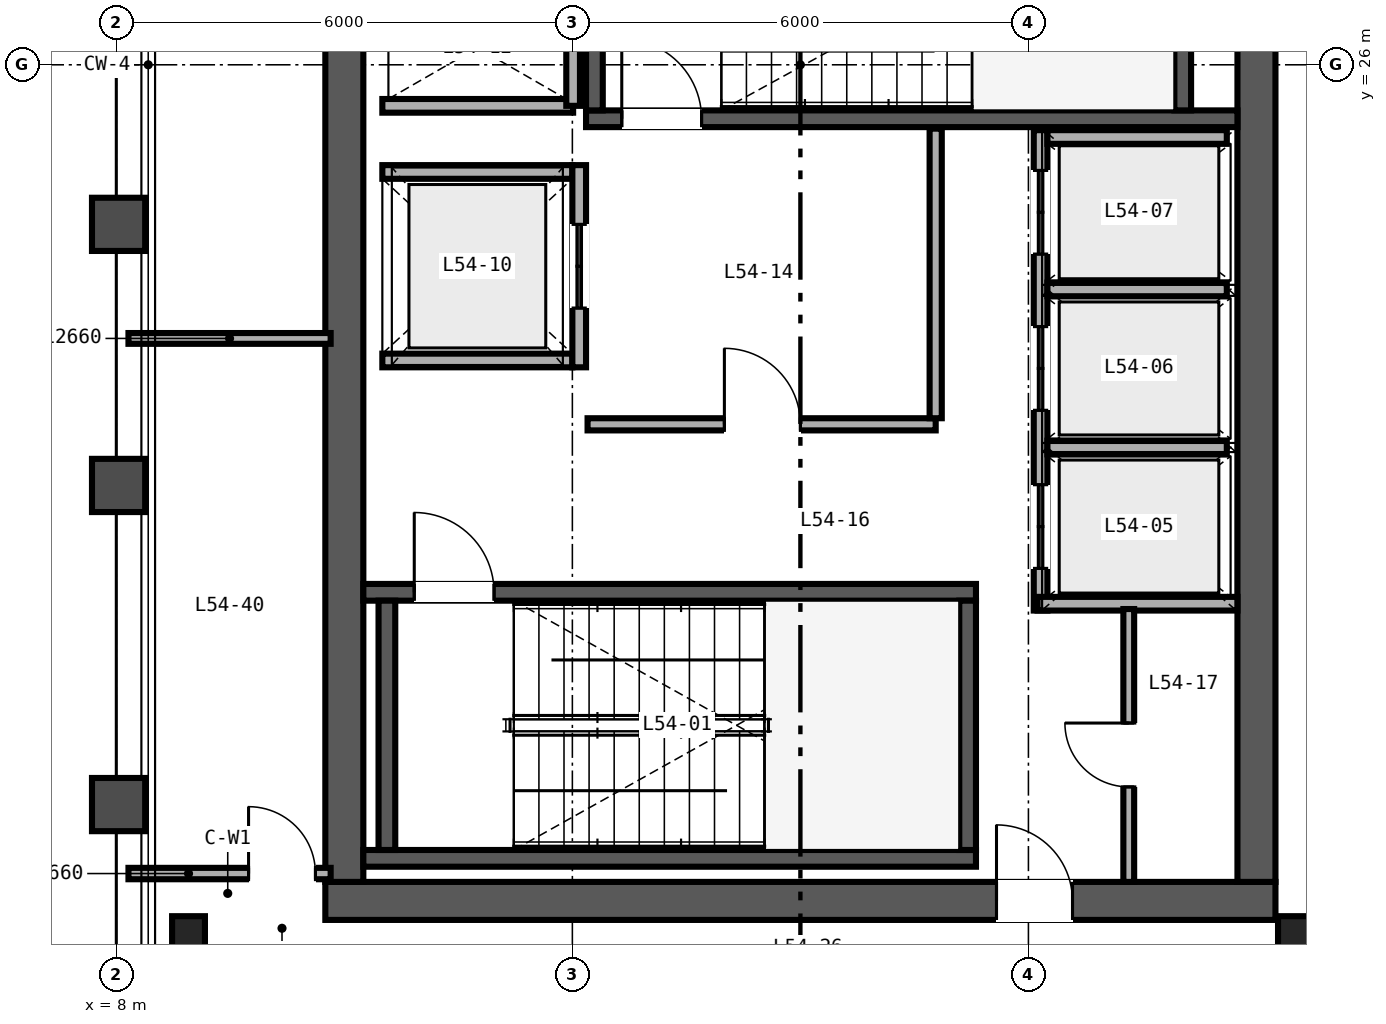
"""IFC4 building model, lengths in metres.
Left out: names, types, materials, properties, quantities, classifications, styles, units other than length and angle.
Written with IfcOpenShell. Run it as: python <this file> out.ifc"""

import sys

from ifc_helpers import new_model, si_unit, direction, frame, frame_2d, origin, origin_2d, place, context, subcontext, project, spatial, rectangle, i_section, extrude, source, transform, mapped, element, fill, save


model = new_model("IFC4")
c1 = context("Model", 3, precision=1e-05, world=origin(), true_north=direction((0.0, 1.0)))
c2 = subcontext(c1, "Body", "Model", "MODEL_VIEW")
j1 = project(units=[si_unit("LENGTHUNIT", "METRE"), si_unit("PLANEANGLEUNIT", "RADIAN")], contexts=[c1])
p1 = place(None, origin())
s1 = spatial("IfcSite", under=j1, at=p1, CompositionType="ELEMENT")
p2 = place(p1, origin())
s2 = spatial("IfcBuilding", under=s1, at=p2, CompositionType="ELEMENT")
p3 = place(p2, frame((0.0, 0.0, 213.6)))
s3 = spatial("IfcBuildingStorey", under=s2, at=p3, CompositionType="ELEMENT", Elevation=213.6)
p4 = place(p3, frame((10.75, 15.0, 0.0), z_axis=(0.0, 0.0, 1.0), x_axis=(1.0, 0.0, 0.0)))
e1 = element("IfcWall", 1, at=p4, inside=s3, PredefinedType="SHEAR", context=c2, shape_type="SweptSolid", body=[
    extrude(rectangle(XDim=12.5, YDim=0.5, at=frame_2d((6.25, 0.0))), origin(), (0.0, 0.0, 1.0), 3.37),
])
p5 = place(p4, frame((8.83, 0.0, 0.0)))
e2 = element("IfcOpeningElement", 2, at=p5, cuts=e1, PredefinedType="OPENING", context=c2, shape_type="SweptSolid", body=[
    extrude(rectangle(XDim=1.0, YDim=2.15, at=frame_2d((0.5, 1.075))), frame((0.0, 0.26, 0.0), z_axis=(0.0, -1.0, 0.0), x_axis=(1.0, 0.0, 0.0)), (0.0, 0.0, 1.0), 0.52),
])
for number, where, z_axis, x_axis in (
    (3, (11.0, 15.25, 0.0), (0.0, 0.0, 1.0), (0.0, 1.0, 0.0)),
    (4, (23.0, 15.25, 0.0), (0.0, 0.0, 1.0), (0.0, 1.0, 0.0)),
):
    element("IfcWall", number, at=place(p3, frame(where, z_axis=z_axis, x_axis=x_axis)), inside=s3, PredefinedType="SHEAR", context=c2, shape_type="SweptSolid", body=[
        extrude(rectangle(XDim=21.5, YDim=0.5, at=frame_2d((10.75, 0.0))), origin(), (0.0, 0.0, 1.0), 3.37),
    ])
p6 = place(p3, frame((11.25, 15.56, 0.0), z_axis=(0.0, 0.0, 1.0), x_axis=(1.0, 0.0, 0.0)))
e5 = element("IfcWall", 5, at=p6, inside=s3, PredefinedType="SHEAR", context=c2, shape_type="SweptSolid", body=[
    extrude(rectangle(XDim=8.06, YDim=0.22, at=frame_2d((4.03, 0.0))), origin(), (0.0, 0.0, 1.0), 3.4),
])
p7 = place(p3, frame((11.25, 19.06, 0.0), z_axis=(0.0, 0.0, 1.0), x_axis=(1.0, 0.0, 0.0)))
e6 = element("IfcWall", 6, at=p7, inside=s3, PredefinedType="SHEAR", context=c2, shape_type="SweptSolid", body=[
    extrude(rectangle(XDim=8.06, YDim=0.22, at=frame_2d((4.03, 0.0))), origin(), (0.0, 0.0, 1.0), 3.4),
])
p8 = place(p7, frame((0.67, 0.0, 0.0)))
e7 = element("IfcOpeningElement", 7, at=p8, cuts=e6, PredefinedType="OPENING", context=c2, shape_type="SweptSolid", body=[
    extrude(rectangle(XDim=1.05, YDim=2.15, at=frame_2d((0.525, 1.075))), frame((0.0, 0.12, 0.0), z_axis=(0.0, -1.0, 0.0), x_axis=(1.0, 0.0, 0.0)), (0.0, 0.0, 1.0), 0.24),
])
for number, where, z_axis, x_axis in (
    (8, (11.56, 15.67, 0.0), (0.0, 0.0, 1.0), (0.0, 1.0, 0.0)),
    (9, (19.2, 15.67, 0.0), (0.0, 0.0, 1.0), (0.0, 1.0, 0.0)),
):
    element("IfcWall", number, at=place(p3, frame(where, z_axis=z_axis, x_axis=x_axis)), inside=s3, PredefinedType="SHEAR", context=c2, shape_type="SweptSolid", body=[
        extrude(rectangle(XDim=3.28, YDim=0.22, at=frame_2d((1.64, 0.0))), origin(), (0.0, 0.0, 1.0), 3.4),
    ])
p9 = place(p3, frame((14.18, 25.29, 0.0), z_axis=(0.0, 0.0, 1.0), x_axis=(1.0, 0.0, 0.0)))
e10 = element("IfcWall", 10, at=p9, inside=s3, PredefinedType="SHEAR", context=c2, shape_type="SweptSolid", body=[
    extrude(rectangle(XDim=8.57, YDim=0.22, at=frame_2d((4.285, 0.0))), origin(), (0.0, 0.0, 1.0), 3.4),
])
p10 = place(p9, frame((0.47, 0.0, 0.0)))
e11 = element("IfcOpeningElement", 11, at=p10, cuts=e10, PredefinedType="OPENING", context=c2, shape_type="SweptSolid", body=[
    extrude(rectangle(XDim=1.05, YDim=2.15, at=frame_2d((0.525, 1.075))), frame((0.0, 0.12, 0.0), z_axis=(0.0, -1.0, 0.0), x_axis=(1.0, 0.0, 0.0)), (0.0, 0.0, 1.0), 0.24),
])
for number, where, z_axis, x_axis in (
    (12, (14.29, 25.4, 0.0), (0.0, 0.0, 1.0), (0.0, 1.0, 0.0)),
    (13, (22.03, 25.4, 0.0), (0.0, 0.0, 1.0), (0.0, 1.0, 0.0)),
):
    element("IfcWall", number, at=place(p3, frame(where, z_axis=z_axis, x_axis=x_axis)), inside=s3, PredefinedType="SHEAR", context=c2, shape_type="SweptSolid", body=[
        extrude(rectangle(XDim=3.28, YDim=0.22, at=frame_2d((1.64, 0.0))), origin(), (0.0, 0.0, 1.0), 3.4),
    ])
m1 = source(origin(), c2, "Body", "SweptSolid", [
    extrude(i_section(OverallWidth=0.432, OverallDepth=0.498, WebThickness=0.056, FlangeThickness=0.089, FilletRadius=0.025, at=origin_2d()), origin(), (0.0, 0.0, 1.0), 3.37),
])
for number, where, z_axis, x_axis in (
    (14, (8.95, 14.55, 0.0), (0.0, 0.0, 1.0), (1.0, 0.0, 0.0)),
    (15, (23.5, 14.55, 0.0), (0.0, 0.0, 1.0), (1.0, 0.0, 0.0)),
):
    element("IfcColumn", number, at=place(p3, frame(where, z_axis=z_axis, x_axis=x_axis)), inside=s3, PredefinedType="COLUMN", context=c2, shape_type="MappedRepresentation", body=[
        mapped(m1, transform((0.0, 0.0, 0.0), scale=1.0)),
    ])
p11 = place(p3, frame((20.16, 18.82, 0.0), z_axis=(0.0, 0.0, 1.0), x_axis=(0.0, 1.0, 0.0)))
e16 = element("IfcWall", 16, at=p11, inside=s3, PredefinedType="SOLIDWALL", context=c2, shape_type="SweptSolid", body=[
    extrude(rectangle(XDim=6.32, YDim=0.18, at=frame_2d((3.16, 0.0))), origin(), (0.0, 0.0, 1.0), 2.47),
])
p12 = place(p11, frame((0.555, 0.0, 0.0)))
e17 = element("IfcOpeningElement", 17, at=p12, cuts=e16, PredefinedType="OPENING", context=c2, shape_type="SweptSolid", body=[
    extrude(rectangle(XDim=1.1, YDim=2.2, at=frame_2d((0.55, 1.1))), frame((0.0, 0.1, 0.0), z_axis=(0.0, -1.0, 0.0), x_axis=(1.0, 0.0, 0.0)), (0.0, 0.0, 1.0), 0.2),
])
p13 = place(p11, frame((2.635, 0.0, 0.0)))
e18 = element("IfcOpeningElement", 18, at=p13, cuts=e16, PredefinedType="OPENING", context=c2, shape_type="SweptSolid", body=[
    extrude(rectangle(XDim=1.1, YDim=2.2, at=frame_2d((0.55, 1.1))), frame((0.0, 0.1, 0.0), z_axis=(0.0, -1.0, 0.0), x_axis=(1.0, 0.0, 0.0)), (0.0, 0.0, 1.0), 0.2),
])
p14 = place(p11, frame((4.69, 0.0, 0.0)))
e19 = element("IfcOpeningElement", 19, at=p14, cuts=e16, PredefinedType="OPENING", context=c2, shape_type="SweptSolid", body=[
    extrude(rectangle(XDim=1.1, YDim=2.2, at=frame_2d((0.55, 1.1))), frame((0.0, 0.1, 0.0), z_axis=(0.0, -1.0, 0.0), x_axis=(1.0, 0.0, 0.0)), (0.0, 0.0, 1.0), 0.2),
])
p15 = place(p3, frame((20.12, 18.91, 0.0), z_axis=(0.0, 0.0, 1.0), x_axis=(1.0, 0.0, 0.0)))
e20 = element("IfcWall", 20, at=p15, inside=s3, PredefinedType="SOLIDWALL", context=c2, shape_type="SweptSolid", body=[
    extrude(rectangle(XDim=2.63, YDim=0.18, at=frame_2d((1.315, 0.0))), origin(), (0.0, 0.0, 1.0), 3.37),
])
p16 = place(p3, frame((20.25, 25.05, 0.0), z_axis=(0.0, 0.0, 1.0), x_axis=(1.0, 0.0, 0.0)))
e21 = element("IfcWall", 21, at=p16, inside=s3, PredefinedType="SOLIDWALL", context=c2, shape_type="SweptSolid", body=[
    extrude(rectangle(XDim=2.36, YDim=0.18, at=frame_2d((1.18, 0.0))), origin(), (0.0, 0.0, 1.0), 3.37),
])
p17 = place(p3, frame((20.25, 20.965, 0.0), z_axis=(0.0, 0.0, 1.0), x_axis=(1.0, 0.0, 0.0)))
e22 = element("IfcWall", 22, at=p17, inside=s3, PredefinedType="SOLIDWALL", context=c2, shape_type="SweptSolid", body=[
    extrude(rectangle(XDim=2.36, YDim=0.18, at=frame_2d((1.18, 0.0))), origin(), (0.0, 0.0, 1.0), 2.47),
])
p18 = place(p3, frame((20.25, 23.045, 0.0), z_axis=(0.0, 0.0, 1.0), x_axis=(1.0, 0.0, 0.0)))
e23 = element("IfcWall", 23, at=p18, inside=s3, PredefinedType="SOLIDWALL", context=c2, shape_type="SweptSolid", body=[
    extrude(rectangle(XDim=2.36, YDim=0.18, at=frame_2d((1.18, 0.0))), origin(), (0.0, 0.0, 1.0), 3.37),
])
for number, where, z_axis, x_axis in (
    (24, (11.5, 22.11, 0.0), (0.0, 0.0, 1.0), (1.0, 0.0, 0.0)),
    (25, (11.5, 24.59, 0.0), (0.0, 0.0, 1.0), (1.0, 0.0, 0.0)),
):
    element("IfcWall", number, at=place(p3, frame(where, z_axis=z_axis, x_axis=x_axis)), inside=s3, PredefinedType="SOLIDWALL", context=c2, shape_type="SweptSolid", body=[
        extrude(rectangle(XDim=2.5, YDim=0.18, at=frame_2d((1.25, 0.0))), origin(), (0.0, 0.0, 1.0), 3.37),
    ])
p19 = place(p3, frame((14.09, 22.02, 0.0), z_axis=(0.0, 0.0, 1.0), x_axis=(0.0, 1.0, 0.0)))
e26 = element("IfcWall", 26, at=p19, inside=s3, PredefinedType="SOLIDWALL", context=c2, shape_type="SweptSolid", body=[
    extrude(rectangle(XDim=2.66, YDim=0.18, at=frame_2d((1.33, 0.0))), origin(), (0.0, 0.0, 1.0), 3.37),
])
p20 = place(p19, frame((0.78, 0.0, 0.0)))
e27 = element("IfcOpeningElement", 27, at=p20, cuts=e26, PredefinedType="OPENING", context=c2, shape_type="SweptSolid", body=[
    extrude(rectangle(XDim=1.1, YDim=2.2, at=frame_2d((0.55, 1.1))), frame((0.0, 0.1, 0.0), z_axis=(0.0, -1.0, 0.0), x_axis=(1.0, 0.0, 0.0)), (0.0, 0.0, 1.0), 0.2),
])
p21 = place(p3, frame((11.5, 25.46, 0.0), z_axis=(0.0, 0.0, 1.0), x_axis=(1.0, 0.0, 0.0)))
e28 = element("IfcWall", 28, at=p21, inside=s3, PredefinedType="SOLIDWALL", context=c2, shape_type="SweptSolid", body=[
    extrude(rectangle(XDim=2.51, YDim=0.18, at=frame_2d((1.255, 0.0))), origin(), (0.0, 0.0, 1.0), 3.37),
])
p22 = place(p3, frame((14.01, 25.46, 0.0), z_axis=(0.0, 0.0, 1.0), x_axis=(0.0, 1.0, 0.0)))
e29 = element("IfcWall", 29, at=p22, inside=s3, PredefinedType="SOLIDWALL", context=c2, shape_type="SweptSolid", body=[
    extrude(rectangle(XDim=3.08, YDim=0.18, at=frame_2d((1.54, 0.0))), origin(), (0.0, 0.0, 1.0), 3.37),
])
p23 = place(p3, frame((14.2, 21.27, 0.0), z_axis=(0.0, 0.0, 1.0), x_axis=(1.0, 0.0, 0.0)))
e30 = element("IfcWall", 30, at=p23, inside=s3, PredefinedType="PARTITIONING", context=c2, shape_type="SweptSolid", body=[
    extrude(rectangle(XDim=4.58, YDim=0.16, at=frame_2d((2.29, 0.0))), origin(), (0.0, 0.0, 1.0), 3.37),
])
p24 = place(p23, frame((1.8, 0.0, 0.0)))
e31 = element("IfcOpeningElement", 31, at=p24, cuts=e30, PredefinedType="OPENING", context=c2, shape_type="SweptSolid", body=[
    extrude(rectangle(XDim=1.0, YDim=2.15, at=frame_2d((0.5, 1.075))), frame((0.0, 0.09, 0.0), z_axis=(0.0, -1.0, 0.0), x_axis=(1.0, 0.0, 0.0)), (0.0, 0.0, 1.0), 0.18),
])
p25 = place(p3, frame((18.78, 21.35, 0.0), z_axis=(0.0, 0.0, 1.0), x_axis=(0.0, 1.0, 0.0)))
e32 = element("IfcWall", 32, at=p25, inside=s3, PredefinedType="PARTITIONING", context=c2, shape_type="SweptSolid", body=[
    extrude(rectangle(XDim=3.81, YDim=0.16, at=frame_2d((1.905, 0.0))), origin(), (0.0, 0.0, 1.0), 3.37),
])
p26 = place(p3, frame((21.32, 15.25, 0.0), z_axis=(0.0, 0.0, 1.0), x_axis=(0.0, 1.0, 0.0)))
e33 = element("IfcWall", 33, at=p26, inside=s3, PredefinedType="PARTITIONING", context=c2, shape_type="SweptSolid", body=[
    extrude(rectangle(XDim=3.59, YDim=0.142, at=frame_2d((1.795, 0.0))), origin(), (0.0, 0.0, 1.0), 3.37),
])
p27 = place(p26, frame((1.25, 0.0, 0.0)))
e34 = element("IfcOpeningElement", 34, at=p27, cuts=e33, PredefinedType="OPENING", context=c2, shape_type="SweptSolid", body=[
    extrude(rectangle(XDim=0.84, YDim=2.1, at=frame_2d((0.42, 1.05))), frame((0.0, 0.081, 0.0), z_axis=(0.0, -1.0, 0.0), x_axis=(1.0, 0.0, 0.0)), (0.0, 0.0, 1.0), 0.162),
])
p28 = place(p3, frame((8.16, 15.36, 0.0), z_axis=(0.0, 0.0, 1.0), x_axis=(1.0, 0.0, 0.0)))
e35 = element("IfcWall", 35, at=p28, inside=s3, PredefinedType="PARTITIONING", context=c2, shape_type="SweptSolid", body=[
    extrude(rectangle(XDim=2.66, YDim=0.15, at=frame_2d((1.33, 0.0))), origin(), (0.0, 0.0, 1.0), 2.591),
])
p29 = place(p28, frame((1.58, 0.0, 0.0)))
e36 = element("IfcOpeningElement", 36, at=p29, cuts=e35, PredefinedType="OPENING", context=c2, shape_type="SweptSolid", body=[
    extrude(rectangle(XDim=0.88, YDim=2.15, at=frame_2d((0.44, 1.075))), frame((0.0, 0.085, 0.0), z_axis=(0.0, -1.0, 0.0), x_axis=(1.0, 0.0, 0.0)), (0.0, 0.0, 1.0), 0.17),
])
p30 = place(p3, frame((8.16, 22.4, 0.0), z_axis=(0.0, 0.0, 1.0), x_axis=(1.0, 0.0, 0.0)))
e37 = element("IfcWall", 37, at=p30, inside=s3, PredefinedType="PARTITIONING", context=c2, shape_type="SweptSolid", body=[
    extrude(rectangle(XDim=2.66, YDim=0.142, at=frame_2d((1.33, 0.0))), origin(), (0.0, 0.0, 1.0), 2.591),
])
m2 = source(origin(), c2, "Body", "SweptSolid", [
    extrude(rectangle(XDim=1.05, YDim=2.15, at=frame_2d((0.525, 1.075))), frame((0.0, 0.025, 0.0), z_axis=(0.0, -1.0, 0.0), x_axis=(1.0, 0.0, 0.0)), (0.0, 0.0, 1.0), 0.05),
])
p31 = place(p8, origin())
e38 = element("IfcDoor", 38, at=p31, inside=s3, OperationType="SINGLE_SWING_LEFT", PredefinedType="DOOR", context=c2, shape_type="MappedRepresentation", body=[
    mapped(m2, transform((0.0, 0.0, 0.0), scale=1.0)),
])
fill(e7, e38)
p32 = place(p10, origin())
e39 = element("IfcDoor", 39, at=p32, inside=s3, OperationType="SINGLE_SWING_LEFT", PredefinedType="DOOR", context=c2, shape_type="MappedRepresentation", body=[
    mapped(m2, transform((0.0, 0.0, 0.0), scale=1.0)),
])
fill(e11, e39)
m3 = source(origin(), c2, "Body", "SweptSolid", [
    extrude(rectangle(XDim=1.1, YDim=2.2, at=frame_2d((0.55, 1.1))), frame((0.0, 0.025, 0.0), z_axis=(0.0, -1.0, 0.0), x_axis=(1.0, 0.0, 0.0)), (0.0, 0.0, 1.0), 0.05),
])
p33 = place(p12, origin())
e40 = element("IfcDoor", 40, at=p33, inside=s3, OperationType="DOUBLE_DOOR_SLIDING", PredefinedType="DOOR", context=c2, shape_type="MappedRepresentation", body=[
    mapped(m3, transform((0.0, 0.0, 0.0), scale=1.0)),
])
fill(e17, e40)
p34 = place(p13, origin())
e41 = element("IfcDoor", 41, at=p34, inside=s3, OperationType="DOUBLE_DOOR_SLIDING", PredefinedType="DOOR", context=c2, shape_type="MappedRepresentation", body=[
    mapped(m3, transform((0.0, 0.0, 0.0), scale=1.0)),
])
fill(e18, e41)
p35 = place(p14, origin())
e42 = element("IfcDoor", 42, at=p35, inside=s3, OperationType="DOUBLE_DOOR_SLIDING", PredefinedType="DOOR", context=c2, shape_type="MappedRepresentation", body=[
    mapped(m3, transform((0.0, 0.0, 0.0), scale=1.0)),
])
fill(e19, e42)
p36 = place(p20, origin())
e43 = element("IfcDoor", 43, at=p36, inside=s3, OperationType="DOUBLE_DOOR_SLIDING", PredefinedType="DOOR", context=c2, shape_type="MappedRepresentation", body=[
    mapped(m3, transform((0.0, 0.0, 0.0), scale=1.0)),
])
fill(e27, e43)
m4 = source(origin(), c2, "Body", "SweptSolid", [
    extrude(rectangle(XDim=1.0, YDim=2.15, at=frame_2d((0.5, 1.075))), frame((0.0, 0.025, 0.0), z_axis=(0.0, -1.0, 0.0), x_axis=(1.0, 0.0, 0.0)), (0.0, 0.0, 1.0), 0.05),
])
p37 = place(p24, origin())
e44 = element("IfcDoor", 44, at=p37, inside=s3, OperationType="SINGLE_SWING_LEFT", PredefinedType="DOOR", context=c2, shape_type="MappedRepresentation", body=[
    mapped(m4, transform((0.0, 0.0, 0.0), scale=1.0)),
])
fill(e31, e44)
m5 = source(origin(), c2, "Body", "SweptSolid", [
    extrude(rectangle(XDim=0.84, YDim=2.1, at=frame_2d((0.42, 1.05))), frame((0.0, 0.025, 0.0), z_axis=(0.0, -1.0, 0.0), x_axis=(1.0, 0.0, 0.0)), (0.0, 0.0, 1.0), 0.05),
])
p38 = place(p27, origin())
e45 = element("IfcDoor", 45, at=p38, inside=s3, OperationType="SINGLE_SWING_RIGHT", PredefinedType="DOOR", context=c2, shape_type="MappedRepresentation", body=[
    mapped(m5, transform((0.0, 0.0, 0.0), scale=1.0)),
])
fill(e34, e45)
p39 = place(p5, origin())
e46 = element("IfcDoor", 46, at=p39, inside=s3, OperationType="SINGLE_SWING_LEFT", PredefinedType="DOOR", context=c2, shape_type="MappedRepresentation", body=[
    mapped(m4, transform((0.0, 0.0, 0.0), scale=1.0)),
])
fill(e2, e46)
m6 = source(origin(), c2, "Body", "SweptSolid", [
    extrude(rectangle(XDim=0.88, YDim=2.15, at=frame_2d((0.44, 1.075))), frame((0.0, 0.025, 0.0), z_axis=(0.0, -1.0, 0.0), x_axis=(1.0, 0.0, 0.0)), (0.0, 0.0, 1.0), 0.05),
])
p40 = place(p29, origin())
e47 = element("IfcDoor", 47, at=p40, inside=s3, OperationType="SINGLE_SWING_LEFT", PredefinedType="DOOR", context=c2, shape_type="MappedRepresentation", body=[
    mapped(m6, transform((0.0, 0.0, 0.0), scale=1.0)),
])
fill(e36, e47)
save(model, sys.argv[1])
